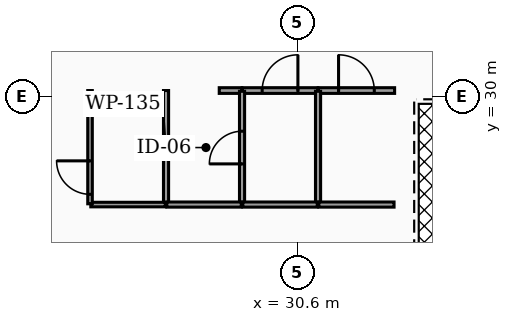
"""IFC4 building model, lengths in metres.
Left out: names, types, materials, properties, quantities, classifications, styles, units other than length and angle.
Written with IfcOpenShell. Run it as: python <this file> out.ifc"""

import sys

from ifc_helpers import new_model, si_unit, direction, frame, frame_2d, origin, place, context, subcontext, project, spatial, rectangle, extrude, element, fill, save


model = new_model("IFC4")
c1 = context("Model", 3, precision=1e-05, world=origin(), true_north=direction((0.0, 1.0)))
c2 = subcontext(c1, "Body", "Model", "MODEL_VIEW")
j1 = project(units=[si_unit("LENGTHUNIT", "METRE"), si_unit("PLANEANGLEUNIT", "RADIAN")], contexts=[c1])
p1 = place(None, origin())
s1 = spatial("IfcSite", under=j1, at=p1, CompositionType="ELEMENT")
p2 = place(p1, origin())
s2 = spatial("IfcBuilding", under=s1, at=p2, CompositionType="ELEMENT")
p3 = place(p2, frame((0.0, 0.0, 123.42)))
s3 = spatial("IfcBuildingStorey", under=s2, at=p3, CompositionType="ELEMENT", Elevation=123.42)
p4 = place(p3, frame((28.55, 30.15, 0.0), z_axis=(0.0, 0.0, 1.0), x_axis=(1.0, 0.0, 0.0)))
e1 = element("IfcWall", 1, at=p4, inside=s3, PredefinedType="PARTITIONING", context=c2, shape_type="SweptSolid", body=[
    extrude(rectangle(XDim=0.595, YDim=0.15, at=frame_2d((0.297, 0.0))), origin(), (0.0, 0.0, 1.0), 2.457),
])
p5 = place(p3, frame((29.155, 30.15, 0.0), z_axis=(0.0, 0.0, 1.0), x_axis=(1.0, 0.0, 0.0)))
e2 = element("IfcWall", 2, at=p5, inside=s3, PredefinedType="PARTITIONING", context=c2, shape_type="SweptSolid", body=[
    extrude(rectangle(XDim=1.99, YDim=0.15, at=frame_2d((0.995, 0.0))), origin(), (0.0, 0.0, 1.0), 2.457),
])
p6 = place(p5, frame((0.525, 0.0, 0.0)))
e3 = element("IfcOpeningElement", 3, at=p6, cuts=e2, PredefinedType="OPENING", context=c2, shape_type="SweptSolid", body=[
    extrude(rectangle(XDim=0.94, YDim=2.05, at=frame_2d((0.47, 1.025))), frame((0.0, 0.085, 0.0), z_axis=(0.0, -1.0, 0.0), x_axis=(1.0, 0.0, 0.0)), (0.0, 0.0, 1.0), 0.17),
])
p7 = place(p3, frame((31.155, 30.15, 0.0), z_axis=(0.0, 0.0, 1.0), x_axis=(1.0, 0.0, 0.0)))
e4 = element("IfcWall", 4, at=p7, inside=s3, PredefinedType="PARTITIONING", context=c2, shape_type="SweptSolid", body=[
    extrude(rectangle(XDim=2.01, YDim=0.15, at=frame_2d((1.005, 0.0))), origin(), (0.0, 0.0, 1.0), 2.457),
])
p8 = place(p7, frame((0.535, 0.0, 0.0)))
e5 = element("IfcOpeningElement", 5, at=p8, cuts=e4, PredefinedType="OPENING", context=c2, shape_type="SweptSolid", body=[
    extrude(rectangle(XDim=0.94, YDim=2.05, at=frame_2d((0.47, 1.025))), frame((0.0, 0.085, 0.0), z_axis=(0.0, -1.0, 0.0), x_axis=(1.0, 0.0, 0.0)), (0.0, 0.0, 1.0), 0.17),
])
p9 = place(p3, frame((27.15, 27.17, 0.0), z_axis=(0.0, 0.0, 1.0), x_axis=(0.0, 1.0, 0.0)))
e6 = element("IfcWall", 6, at=p9, inside=s3, PredefinedType="PARTITIONING", context=c2, shape_type="SweptSolid", body=[
    extrude(rectangle(XDim=2.98, YDim=0.135, at=frame_2d((1.49, 0.0))), origin(), (0.0, 0.0, 1.0), 2.457),
])
p10 = place(p3, frame((25.17, 27.15, 0.0), z_axis=(0.0, 0.0, 1.0), x_axis=(1.0, 0.0, 0.0)))
e7 = element("IfcWall", 7, at=p10, inside=s3, PredefinedType="PARTITIONING", context=c2, shape_type="SweptSolid", body=[
    extrude(rectangle(XDim=1.96, YDim=0.12, at=frame_2d((0.98, 0.0))), origin(), (0.0, 0.0, 1.0), 2.457),
])
p11 = place(p3, frame((25.15, 27.17, 0.0), z_axis=(0.0, 0.0, 1.0), x_axis=(0.0, 1.0, 0.0)))
e8 = element("IfcWall", 8, at=p11, inside=s3, PredefinedType="PARTITIONING", context=c2, shape_type="SweptSolid", body=[
    extrude(rectangle(XDim=2.98, YDim=0.12, at=frame_2d((1.49, 0.0))), origin(), (0.0, 0.0, 1.0), 2.457),
])
p12 = place(p11, frame((0.25, 0.0, 0.0)))
e9 = element("IfcOpeningElement", 9, at=p12, cuts=e8, PredefinedType="OPENING", context=c2, shape_type="SweptSolid", body=[
    extrude(rectangle(XDim=0.88, YDim=2.05, at=frame_2d((0.44, 1.025))), frame((0.0, 0.07, 0.0), z_axis=(0.0, -1.0, 0.0), x_axis=(1.0, 0.0, 0.0)), (0.0, 0.0, 1.0), 0.14),
])
p13 = place(p3, frame((29.15, 27.17, 0.0), z_axis=(0.0, 0.0, 1.0), x_axis=(0.0, 1.0, 0.0)))
e10 = element("IfcWall", 10, at=p13, inside=s3, PredefinedType="PARTITIONING", context=c2, shape_type="SweptSolid", body=[
    extrude(rectangle(XDim=2.96, YDim=0.135, at=frame_2d((1.48, 0.0))), origin(), (0.0, 0.0, 1.0), 2.457),
])
p14 = place(p13, frame((1.05, 0.0, 0.0)))
e11 = element("IfcOpeningElement", 11, at=p14, cuts=e10, PredefinedType="OPENING", context=c2, shape_type="SweptSolid", body=[
    extrude(rectangle(XDim=0.86, YDim=2.05, at=frame_2d((0.43, 1.025))), frame((0.0, 0.077, 0.0), z_axis=(0.0, -1.0, 0.0), x_axis=(1.0, 0.0, 0.0)), (0.0, 0.0, 1.0), 0.155),
])
p15 = place(p3, frame((27.17, 27.15, 0.0), z_axis=(0.0, 0.0, 1.0), x_axis=(1.0, 0.0, 0.0)))
e12 = element("IfcWall", 12, at=p15, inside=s3, PredefinedType="PARTITIONING", context=c2, shape_type="SweptSolid", body=[
    extrude(rectangle(XDim=1.96, YDim=0.135, at=frame_2d((0.98, 0.0))), origin(), (0.0, 0.0, 1.0), 2.457),
])
p16 = place(p3, frame((31.15, 27.17, 0.0), z_axis=(0.0, 0.0, 1.0), x_axis=(0.0, 1.0, 0.0)))
e13 = element("IfcWall", 13, at=p16, inside=s3, PredefinedType="PARTITIONING", context=c2, shape_type="SweptSolid", body=[
    extrude(rectangle(XDim=2.96, YDim=0.135, at=frame_2d((1.48, 0.0))), origin(), (0.0, 0.0, 1.0), 2.457),
])
p17 = place(p3, frame((29.17, 27.15, 0.0), z_axis=(0.0, 0.0, 1.0), x_axis=(1.0, 0.0, 0.0)))
e14 = element("IfcWall", 14, at=p17, inside=s3, PredefinedType="PARTITIONING", context=c2, shape_type="SweptSolid", body=[
    extrude(rectangle(XDim=1.96, YDim=0.135, at=frame_2d((0.98, 0.0))), origin(), (0.0, 0.0, 1.0), 2.457),
])
p18 = place(p3, frame((31.17, 27.15, 0.0), z_axis=(0.0, 0.0, 1.0), x_axis=(1.0, 0.0, 0.0)))
e15 = element("IfcWall", 15, at=p18, inside=s3, PredefinedType="PARTITIONING", context=c2, shape_type="SweptSolid", body=[
    extrude(rectangle(XDim=1.98, YDim=0.135, at=frame_2d((0.99, 0.0))), origin(), (0.0, 0.0, 1.0), 2.457),
])
p19 = place(p6, origin())
e16 = element("IfcDoor", 16, at=p19, inside=s3, OperationType="SINGLE_SWING_RIGHT", PredefinedType="DOOR", context=c2, shape_type="SweptSolid", body=[
    extrude(rectangle(XDim=0.94, YDim=2.05, at=frame_2d((0.47, 1.025))), frame((0.0, 0.025, 0.0), z_axis=(0.0, -1.0, 0.0), x_axis=(1.0, 0.0, 0.0)), (0.0, 0.0, 1.0), 0.05),
])
fill(e3, e16)
p20 = place(p8, origin())
e17 = element("IfcDoor", 17, at=p20, inside=s3, OperationType="SINGLE_SWING_LEFT", PredefinedType="DOOR", context=c2, shape_type="SweptSolid", body=[
    extrude(rectangle(XDim=0.94, YDim=2.05, at=frame_2d((0.47, 1.025))), frame((0.0, 0.025, 0.0), z_axis=(0.0, -1.0, 0.0), x_axis=(1.0, 0.0, 0.0)), (0.0, 0.0, 1.0), 0.05),
])
fill(e5, e17)
p21 = place(p12, origin())
e18 = element("IfcDoor", 18, at=p21, inside=s3, OperationType="SINGLE_SWING_RIGHT", PredefinedType="DOOR", context=c2, shape_type="SweptSolid", body=[
    extrude(rectangle(XDim=0.88, YDim=2.05, at=frame_2d((0.44, 1.025))), frame((0.0, 0.025, 0.0), z_axis=(0.0, -1.0, 0.0), x_axis=(1.0, 0.0, 0.0)), (0.0, 0.0, 1.0), 0.05),
])
fill(e9, e18)
p22 = place(p14, origin())
e19 = element("IfcDoor", 19, at=p22, inside=s3, OperationType="SINGLE_SWING_LEFT", PredefinedType="DOOR", context=c2, shape_type="SweptSolid", body=[
    extrude(rectangle(XDim=0.86, YDim=2.05, at=frame_2d((0.43, 1.025))), frame((0.0, 0.025, 0.0), z_axis=(0.0, -1.0, 0.0), x_axis=(1.0, 0.0, 0.0)), (0.0, 0.0, 1.0), 0.05),
])
fill(e11, e19)
save(model, sys.argv[1])
